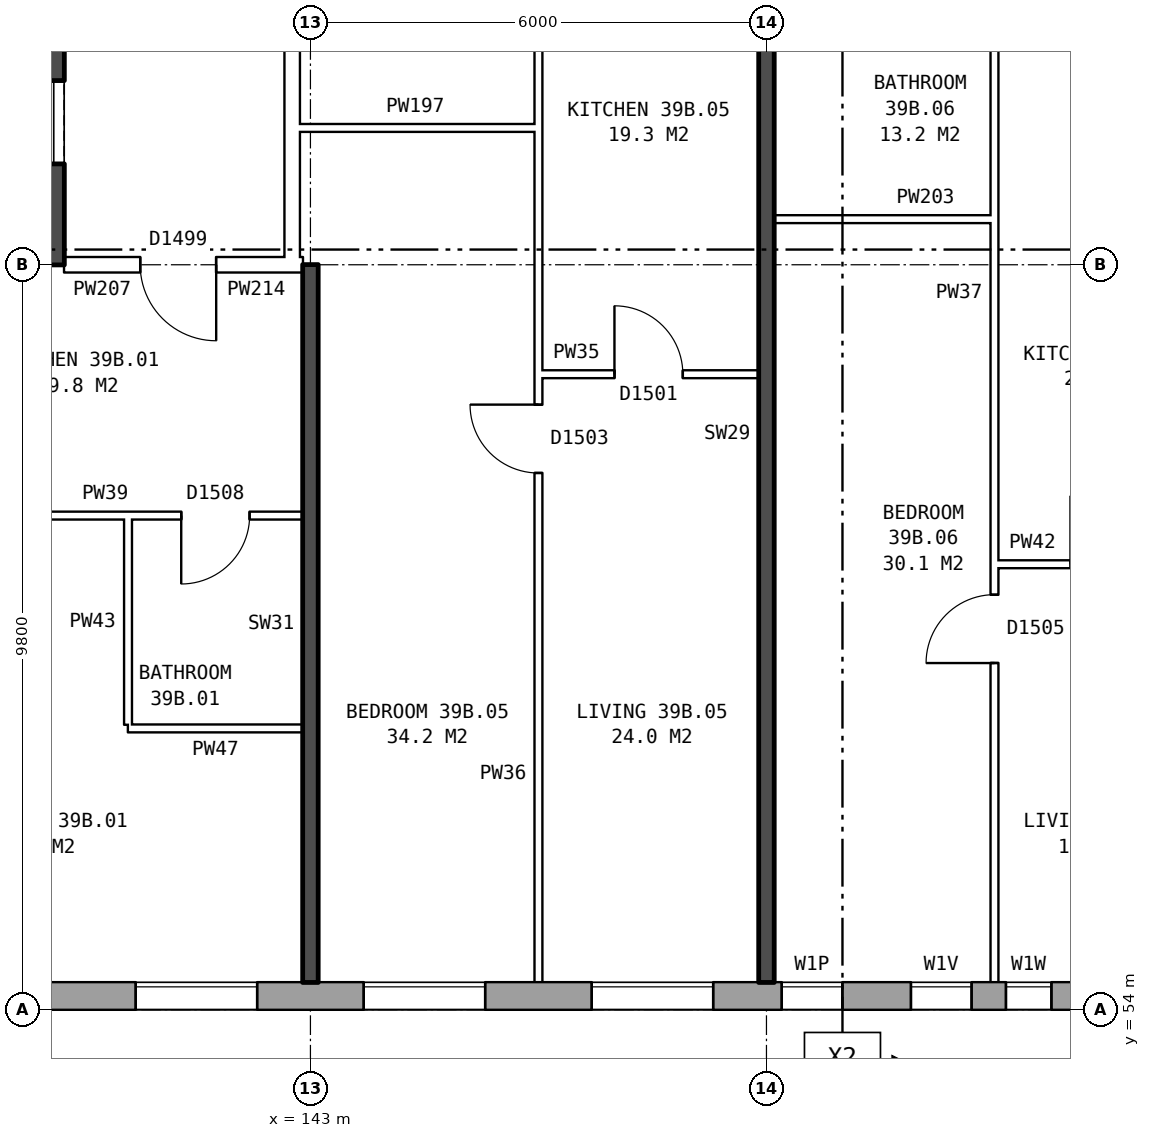
"""IFC4 building model, lengths in metres.
Left out: names, types, materials, properties, quantities, classifications, styles, units other than length and angle.
Written with IfcOpenShell. Run it as: python <this file> out.ifc"""

import sys

from ifc_helpers import new_model, si_unit, direction, frame, frame_2d, origin, place, context, subcontext, project, spatial, rectangle, extrude, element, fill, save


model = new_model("IFC4")
c1 = context("Model", 3, precision=1e-05, world=origin(), true_north=direction((0.0, 1.0)))
c2 = subcontext(c1, "Body", "Model", "MODEL_VIEW")
j1 = project(units=[si_unit("LENGTHUNIT", "METRE"), si_unit("PLANEANGLEUNIT", "RADIAN")], contexts=[c1])
p1 = place(None, origin())
s1 = spatial("IfcSite", under=j1, at=p1, CompositionType="ELEMENT")
p2 = place(p1, origin())
s2 = spatial("IfcBuilding", under=s1, at=p2, CompositionType="ELEMENT")
p3 = place(p2, frame((0.0, 0.0, 139.2)))
s3 = spatial("IfcBuildingStorey", under=s2, at=p3, CompositionType="ELEMENT", Elevation=139.2)
p4 = place(p3, frame((134.075, 54.18, 0.0), z_axis=(0.0, 0.0, 1.0), x_axis=(1.0, 0.0, 0.0)))
e1 = element("IfcWall", 1, at=p4, inside=s3, PredefinedType="STANDARD", context=c2, shape_type="SweptSolid", body=[
    extrude(rectangle(XDim=35.601, YDim=0.36, at=frame_2d((17.8, 0.0))), origin(), (0.0, 0.0, 1.0), 2.85),
])
p5 = place(p4, frame((0.625, 0.0, 0.8)))
e2 = element("IfcOpeningElement", 2, at=p5, cuts=e1, PredefinedType="OPENING", context=c2, shape_type="SweptSolid", body=[
    extrude(rectangle(XDim=1.6, YDim=1.8, at=frame_2d((0.8, 0.9))), frame((0.0, 0.19, 0.0), z_axis=(0.0, -1.0, 0.0), x_axis=(1.0, 0.0, 0.0)), (0.0, 0.0, 1.0), 0.38),
])
p6 = place(p4, frame((3.625, 0.0, 0.8)))
e3 = element("IfcOpeningElement", 3, at=p6, cuts=e1, PredefinedType="OPENING", context=c2, shape_type="SweptSolid", body=[
    extrude(rectangle(XDim=1.6, YDim=1.8, at=frame_2d((0.8, 0.9))), frame((0.0, 0.19, 0.0), z_axis=(0.0, -1.0, 0.0), x_axis=(1.0, 0.0, 0.0)), (0.0, 0.0, 1.0), 0.38),
])
p7 = place(p4, frame((6.625, 0.0, 0.8)))
e4 = element("IfcOpeningElement", 4, at=p7, cuts=e1, PredefinedType="OPENING", context=c2, shape_type="SweptSolid", body=[
    extrude(rectangle(XDim=1.6, YDim=1.8, at=frame_2d((0.8, 0.9))), frame((0.0, 0.19, 0.0), z_axis=(0.0, -1.0, 0.0), x_axis=(1.0, 0.0, 0.0)), (0.0, 0.0, 1.0), 0.38),
])
p8 = place(p4, frame((9.625, 0.0, 0.8)))
e5 = element("IfcOpeningElement", 5, at=p8, cuts=e1, PredefinedType="OPENING", context=c2, shape_type="SweptSolid", body=[
    extrude(rectangle(XDim=1.6, YDim=1.8, at=frame_2d((0.8, 0.9))), frame((0.0, 0.19, 0.0), z_axis=(0.0, -1.0, 0.0), x_axis=(1.0, 0.0, 0.0)), (0.0, 0.0, 1.0), 0.38),
])
p9 = place(p4, frame((12.625, 0.0, 0.8)))
e6 = element("IfcOpeningElement", 6, at=p9, cuts=e1, PredefinedType="OPENING", context=c2, shape_type="SweptSolid", body=[
    extrude(rectangle(XDim=1.6, YDim=1.8, at=frame_2d((0.8, 0.9))), frame((0.0, 0.19, 0.0), z_axis=(0.0, -1.0, 0.0), x_axis=(1.0, 0.0, 0.0)), (0.0, 0.0, 1.0), 0.38),
])
p10 = place(p4, frame((15.125, 0.0, 1.25)))
e7 = element("IfcOpeningElement", 7, at=p10, cuts=e1, PredefinedType="OPENING", context=c2, shape_type="SweptSolid", body=[
    extrude(rectangle(XDim=0.8, YDim=1.2, at=frame_2d((0.4, 0.6))), frame((0.0, 0.19, 0.0), z_axis=(0.0, -1.0, 0.0), x_axis=(1.0, 0.0, 0.0)), (0.0, 0.0, 1.0), 0.38),
])
p11 = place(p4, frame((18.075, 0.0, 0.25)))
e8 = element("IfcOpeningElement", 8, at=p11, cuts=e1, PredefinedType="OPENING", context=c2, shape_type="SweptSolid", body=[
    extrude(rectangle(XDim=0.6, YDim=0.9, at=frame_2d((0.3, 0.45))), frame((0.0, 0.19, 0.0), z_axis=(0.0, -1.0, 0.0), x_axis=(1.0, 0.0, 0.0)), (0.0, 0.0, 1.0), 0.38),
])
p12 = place(p4, frame((21.625, 0.0, 0.8)))
e9 = element("IfcOpeningElement", 9, at=p12, cuts=e1, PredefinedType="OPENING", context=c2, shape_type="SweptSolid", body=[
    extrude(rectangle(XDim=1.6, YDim=1.8, at=frame_2d((0.8, 0.9))), frame((0.0, 0.19, 0.0), z_axis=(0.0, -1.0, 0.0), x_axis=(1.0, 0.0, 0.0)), (0.0, 0.0, 1.0), 0.38),
])
p13 = place(p4, frame((24.625, 0.0, 0.8)))
e10 = element("IfcOpeningElement", 10, at=p13, cuts=e1, PredefinedType="OPENING", context=c2, shape_type="SweptSolid", body=[
    extrude(rectangle(XDim=1.6, YDim=1.8, at=frame_2d((0.8, 0.9))), frame((0.0, 0.19, 0.0), z_axis=(0.0, -1.0, 0.0), x_axis=(1.0, 0.0, 0.0)), (0.0, 0.0, 1.0), 0.38),
])
p14 = place(p4, frame((27.625, 0.0, 0.8)))
e11 = element("IfcOpeningElement", 11, at=p14, cuts=e1, PredefinedType="OPENING", context=c2, shape_type="SweptSolid", body=[
    extrude(rectangle(XDim=1.6, YDim=1.8, at=frame_2d((0.8, 0.9))), frame((0.0, 0.19, 0.0), z_axis=(0.0, -1.0, 0.0), x_axis=(1.0, 0.0, 0.0)), (0.0, 0.0, 1.0), 0.38),
])
p15 = place(p4, frame((30.625, 0.0, 0.8)))
e12 = element("IfcOpeningElement", 12, at=p15, cuts=e1, PredefinedType="OPENING", context=c2, shape_type="SweptSolid", body=[
    extrude(rectangle(XDim=1.6, YDim=1.8, at=frame_2d((0.8, 0.9))), frame((0.0, 0.19, 0.0), z_axis=(0.0, -1.0, 0.0), x_axis=(1.0, 0.0, 0.0)), (0.0, 0.0, 1.0), 0.38),
])
p16 = place(p4, frame((33.625, 0.0, 0.8)))
e13 = element("IfcOpeningElement", 13, at=p16, cuts=e1, PredefinedType="OPENING", context=c2, shape_type="SweptSolid", body=[
    extrude(rectangle(XDim=1.6, YDim=1.8, at=frame_2d((0.8, 0.9))), frame((0.0, 0.19, 0.0), z_axis=(0.0, -1.0, 0.0), x_axis=(1.0, 0.0, 0.0)), (0.0, 0.0, 1.0), 0.38),
])
p17 = place(p4, frame((16.825, 0.0, 0.15)))
e14 = element("IfcOpeningElement", 14, at=p17, cuts=e1, PredefinedType="OPENING", context=c2, shape_type="SweptSolid", body=[
    extrude(rectangle(XDim=0.8, YDim=0.9, at=frame_2d((0.4, 0.45))), frame((0.0, 0.19, 0.0), z_axis=(0.0, -1.0, 0.0), x_axis=(1.0, 0.0, 0.0)), (0.0, 0.0, 1.0), 0.38),
])
p18 = place(p4, frame((19.325, 0.0, 1.65)))
e15 = element("IfcOpeningElement", 15, at=p18, cuts=e1, PredefinedType="OPENING", context=c2, shape_type="SweptSolid", body=[
    extrude(rectangle(XDim=1.4, YDim=0.9, at=frame_2d((0.7, 0.45))), frame((0.0, 0.19, 0.0), z_axis=(0.0, -1.0, 0.0), x_axis=(1.0, 0.0, 0.0)), (0.0, 0.0, 1.0), 0.38),
])
p19 = place(p3, frame((139.485, 63.8, 0.0), z_axis=(0.0, 0.0, 1.0), x_axis=(0.0, 1.0, 0.0)))
e16 = element("IfcWall", 16, at=p19, inside=s3, PredefinedType="SHEAR", context=c2, shape_type="SweptSolid", body=[
    extrude(rectangle(XDim=12.4, YDim=0.55, at=frame_2d((6.2, 0.0))), origin(), (0.0, 0.0, 1.0), 2.85),
])
p20 = place(p19, frame((1.325, 0.0, 0.0)))
e17 = element("IfcOpeningElement", 17, at=p20, cuts=e16, PredefinedType="OPENING", context=c2, shape_type="SweptSolid", body=[
    extrude(rectangle(XDim=1.1, YDim=2.1, at=frame_2d((0.55, 1.05))), frame((0.0, 0.285, 0.0), z_axis=(0.0, -1.0, 0.0), x_axis=(1.0, 0.0, 0.0)), (0.0, 0.0, 1.0), 0.57),
])
p21 = place(p19, frame((3.6, 0.0, 0.0)))
e18 = element("IfcOpeningElement", 18, at=p21, cuts=e16, PredefinedType="OPENING", context=c2, shape_type="SweptSolid", body=[
    extrude(rectangle(XDim=1.1, YDim=2.1, at=frame_2d((0.55, 1.05))), frame((0.0, 0.285, 0.0), z_axis=(0.0, -1.0, 0.0), x_axis=(1.0, 0.0, 0.0)), (0.0, 0.0, 1.0), 0.57),
])
p22 = place(p19, frame((5.8, 0.0, 0.0)))
e19 = element("IfcOpeningElement", 19, at=p22, cuts=e16, PredefinedType="OPENING", context=c2, shape_type="SweptSolid", body=[
    extrude(rectangle(XDim=1.1, YDim=2.1, at=frame_2d((0.55, 1.05))), frame((0.0, 0.285, 0.0), z_axis=(0.0, -1.0, 0.0), x_axis=(1.0, 0.0, 0.0)), (0.0, 0.0, 1.0), 0.57),
])
p23 = place(p19, frame((9.9, 0.0, 0.0)))
e20 = element("IfcOpeningElement", 20, at=p23, cuts=e16, PredefinedType="OPENING", context=c2, shape_type="SweptSolid", body=[
    extrude(rectangle(XDim=1.1, YDim=2.1, at=frame_2d((0.55, 1.05))), frame((0.0, 0.285, 0.0), z_axis=(0.0, -1.0, 0.0), x_axis=(1.0, 0.0, 0.0)), (0.0, 0.0, 1.0), 0.57),
])
p24 = place(p19, frame((8.125, 0.0, 0.0)))
e21 = element("IfcOpeningElement", 21, at=p24, cuts=e16, PredefinedType="OPENING", context=c2, shape_type="SweptSolid", body=[
    extrude(rectangle(XDim=0.85, YDim=2.1, at=frame_2d((0.425, 1.05))), frame((0.0, 0.285, 0.0), z_axis=(0.0, -1.0, 0.0), x_axis=(1.0, 0.0, 0.0)), (0.0, 0.0, 1.0), 0.57),
])
p25 = place(p3, frame((142.76, 63.9, 0.0), z_axis=(0.0, 0.0, 1.0), x_axis=(0.0, 1.0, 0.0)))
e22 = element("IfcWall", 22, at=p25, inside=s3, PredefinedType="PARTITIONING", context=c2, shape_type="SweptSolid", body=[
    extrude(rectangle(XDim=12.2, YDim=0.2, at=frame_2d((6.1, 0.0))), origin(), (0.0, 0.0, 1.0), 2.85),
])
p26 = place(p25, frame((5.1, 0.0, 0.0)))
e23 = element("IfcOpeningElement", 23, at=p26, cuts=e22, PredefinedType="OPENING", context=c2, shape_type="SweptSolid", body=[
    extrude(rectangle(XDim=2.0, YDim=2.1, at=frame_2d((1.0, 1.05))), frame((0.0, 0.11, 0.0), z_axis=(0.0, -1.0, 0.0), x_axis=(1.0, 0.0, 0.0)), (0.0, 0.0, 1.0), 0.22),
])
p27 = place(p3, frame((140.6, 57.7, 0.0), z_axis=(0.0, 0.0, 1.0), x_axis=(1.0, 0.0, 0.0)))
e24 = element("IfcWall", 24, at=p27, inside=s3, PredefinedType="PARTITIONING", context=c2, shape_type="SweptSolid", body=[
    extrude(rectangle(XDim=2.3, YDim=0.1, at=frame_2d((1.15, 0.0))), origin(), (0.0, 0.0, 1.0), 2.85),
])
p28 = place(p3, frame((152.0, 59.86, 0.0), z_axis=(0.0, 0.0, 1.0), x_axis=(1.0, 0.0, 0.0)))
e25 = element("IfcWall", 25, at=p28, inside=s3, PredefinedType="PARTITIONING", context=c2, shape_type="SweptSolid", body=[
    extrude(rectangle(XDim=2.9, YDim=0.1, at=frame_2d((1.45, 0.0))), origin(), (0.0, 0.0, 1.0), 2.85),
])
p29 = place(p28, frame((1.0, 0.0, 0.0)))
e26 = element("IfcOpeningElement", 26, at=p29, cuts=e25, PredefinedType="OPENING", context=c2, shape_type="SweptSolid", body=[
    extrude(rectangle(XDim=0.9, YDim=2.1, at=frame_2d((0.45, 1.05))), frame((0.0, 0.06, 0.0), z_axis=(0.0, -1.0, 0.0), x_axis=(1.0, 0.0, 0.0)), (0.0, 0.0, 1.0), 0.12),
])
p30 = place(p3, frame((137.1, 60.5, 0.0), z_axis=(0.0, 0.0, 1.0), x_axis=(1.0, 0.0, 0.0)))
e27 = element("IfcWall", 27, at=p30, inside=s3, PredefinedType="PARTITIONING", context=c2, shape_type="SweptSolid", body=[
    extrude(rectangle(XDim=5.8, YDim=0.1, at=frame_2d((2.9, 0.0))), origin(), (0.0, 0.0, 1.0), 2.85),
])
p31 = place(p30, frame((1.3, 0.0, 0.0)))
e28 = element("IfcOpeningElement", 28, at=p31, cuts=e27, PredefinedType="OPENING", context=c2, shape_type="SweptSolid", body=[
    extrude(rectangle(XDim=0.9, YDim=2.1, at=frame_2d((0.45, 1.05))), frame((0.0, 0.06, 0.0), z_axis=(0.0, -1.0, 0.0), x_axis=(1.0, 0.0, 0.0)), (0.0, 0.0, 1.0), 0.12),
])
p32 = place(p30, frame((4.2, 0.0, 0.0)))
e29 = element("IfcOpeningElement", 29, at=p32, cuts=e27, PredefinedType="OPENING", context=c2, shape_type="SweptSolid", body=[
    extrude(rectangle(XDim=0.9, YDim=2.1, at=frame_2d((0.45, 1.05))), frame((0.0, 0.06, 0.0), z_axis=(0.0, -1.0, 0.0), x_axis=(1.0, 0.0, 0.0)), (0.0, 0.0, 1.0), 0.12),
])
p33 = place(p3, frame((146.0, 62.36, 0.0), z_axis=(0.0, 0.0, 1.0), x_axis=(1.0, 0.0, 0.0)))
e30 = element("IfcWall", 30, at=p33, inside=s3, PredefinedType="PARTITIONING", context=c2, shape_type="SweptSolid", body=[
    extrude(rectangle(XDim=2.9, YDim=0.1, at=frame_2d((1.45, 0.0))), origin(), (0.0, 0.0, 1.0), 2.85),
])
p34 = place(p33, frame((1.0, 0.0, 0.0)))
e31 = element("IfcOpeningElement", 31, at=p34, cuts=e30, PredefinedType="OPENING", context=c2, shape_type="SweptSolid", body=[
    extrude(rectangle(XDim=0.9, YDim=2.1, at=frame_2d((0.45, 1.05))), frame((0.0, 0.06, 0.0), z_axis=(0.0, -1.0, 0.0), x_axis=(1.0, 0.0, 0.0)), (0.0, 0.0, 1.0), 0.12),
])
p35 = place(p3, frame((139.76, 63.8, 0.0), z_axis=(0.0, 0.0, 1.0), x_axis=(1.0, 0.0, 0.0)))
e32 = element("IfcWall", 32, at=p35, inside=s3, PredefinedType="PARTITIONING", context=c2, shape_type="SweptSolid", body=[
    extrude(rectangle(XDim=3.0, YDim=0.2, at=frame_2d((1.5, 0.0))), origin(), (0.0, 0.0, 1.0), 2.85),
])
p36 = place(p35, frame((1.0, 0.0, 0.0)))
e33 = element("IfcOpeningElement", 33, at=p36, cuts=e32, PredefinedType="OPENING", context=c2, shape_type="SweptSolid", body=[
    extrude(rectangle(XDim=1.0, YDim=2.1, at=frame_2d((0.5, 1.05))), frame((0.0, 0.11, 0.0), z_axis=(0.0, -1.0, 0.0), x_axis=(1.0, 0.0, 0.0)), (0.0, 0.0, 1.0), 0.22),
])
p37 = place(p3, frame((142.76, 63.8, 0.0), z_axis=(0.0, 0.0, 1.0), x_axis=(1.0, 0.0, 0.0)))
e34 = element("IfcWall", 34, at=p37, inside=s3, PredefinedType="PARTITIONING", context=c2, shape_type="SweptSolid", body=[
    extrude(rectangle(XDim=0.14, YDim=0.2, at=frame_2d((0.07, 0.0))), origin(), (0.0, 0.0, 1.0), 2.85),
])
p38 = place(p3, frame((149.1, 64.4, 0.0), z_axis=(0.0, 0.0, 1.0), x_axis=(1.0, 0.0, 0.0)))
e35 = element("IfcWall", 35, at=p38, inside=s3, PredefinedType="PARTITIONING", context=c2, shape_type="SweptSolid", body=[
    extrude(rectangle(XDim=2.9, YDim=0.1, at=frame_2d((1.45, 0.0))), origin(), (0.0, 0.0, 1.0), 2.85),
])
p39 = place(p3, frame((142.76, 65.6, 0.0), z_axis=(0.0, 0.0, 1.0), x_axis=(1.0, 0.0, 0.0)))
e36 = element("IfcWall", 36, at=p39, inside=s3, PredefinedType="PARTITIONING", context=c2, shape_type="SweptSolid", body=[
    extrude(rectangle(XDim=3.24, YDim=0.1, at=frame_2d((1.62, 0.0))), origin(), (0.0, 0.0, 1.0), 2.85),
])
p40 = place(p3, frame((140.6, 57.75, 0.0), z_axis=(0.0, 0.0, 1.0), x_axis=(0.0, 1.0, 0.0)))
e37 = element("IfcWall", 37, at=p40, inside=s3, PredefinedType="PARTITIONING", context=c2, shape_type="SweptSolid", body=[
    extrude(rectangle(XDim=2.7, YDim=0.1, at=frame_2d((1.35, 0.0))), origin(), (0.0, 0.0, 1.0), 2.85),
])
p41 = place(p3, frame((143.0, 54.36, 0.0), z_axis=(0.0, 0.0, 1.0), x_axis=(0.0, 1.0, 0.0)))
e38 = element("IfcWall", 38, at=p41, inside=s3, PredefinedType="SOLIDWALL", context=c2, shape_type="SweptSolid", body=[
    extrude(rectangle(XDim=9.44, YDim=0.2, at=frame_2d((4.72, 0.0))), origin(), (0.0, 0.0, 1.0), 2.85),
])
p42 = place(p3, frame((146.0, 54.36, 0.0), z_axis=(0.0, 0.0, 1.0), x_axis=(0.0, 1.0, 0.0)))
e39 = element("IfcWall", 39, at=p42, inside=s3, PredefinedType="PARTITIONING", context=c2, shape_type="SweptSolid", body=[
    extrude(rectangle(XDim=14.34, YDim=0.1, at=frame_2d((7.17, 0.0))), origin(), (0.0, 0.0, 1.0), 2.85),
])
p43 = place(p42, frame((6.7, 0.0, 0.0)))
e40 = element("IfcOpeningElement", 40, at=p43, cuts=e39, PredefinedType="OPENING", context=c2, shape_type="SweptSolid", body=[
    extrude(rectangle(XDim=0.9, YDim=2.1, at=frame_2d((0.45, 1.05))), frame((0.0, 0.06, 0.0), z_axis=(0.0, -1.0, 0.0), x_axis=(1.0, 0.0, 0.0)), (0.0, 0.0, 1.0), 0.12),
])
p44 = place(p42, frame((13.04, 0.0, 0.0)))
e41 = element("IfcOpeningElement", 41, at=p44, cuts=e39, PredefinedType="OPENING", context=c2, shape_type="SweptSolid", body=[
    extrude(rectangle(XDim=0.9, YDim=2.1, at=frame_2d((0.45, 1.05))), frame((0.0, 0.06, 0.0), z_axis=(0.0, -1.0, 0.0), x_axis=(1.0, 0.0, 0.0)), (0.0, 0.0, 1.0), 0.12),
])
p45 = place(p3, frame((149.0, 54.36, 0.0), z_axis=(0.0, 0.0, 1.0), x_axis=(0.0, 1.0, 0.0)))
e42 = element("IfcWall", 42, at=p45, inside=s3, PredefinedType="SOLIDWALL", context=c2, shape_type="SweptSolid", body=[
    extrude(rectangle(XDim=14.44, YDim=0.2, at=frame_2d((7.22, 0.0))), origin(), (0.0, 0.0, 1.0), 2.85),
])
p46 = place(p3, frame((152.0, 54.36, 0.0), z_axis=(0.0, 0.0, 1.0), x_axis=(0.0, 1.0, 0.0)))
e43 = element("IfcWall", 43, at=p46, inside=s3, PredefinedType="PARTITIONING", context=c2, shape_type="SweptSolid", body=[
    extrude(rectangle(XDim=14.34, YDim=0.1, at=frame_2d((7.17, 0.0))), origin(), (0.0, 0.0, 1.0), 2.85),
])
p47 = place(p46, frame((4.2, 0.0, 0.0)))
e44 = element("IfcOpeningElement", 44, at=p47, cuts=e43, PredefinedType="OPENING", context=c2, shape_type="SweptSolid", body=[
    extrude(rectangle(XDim=0.9, YDim=2.1, at=frame_2d((0.45, 1.05))), frame((0.0, 0.06, 0.0), z_axis=(0.0, -1.0, 0.0), x_axis=(1.0, 0.0, 0.0)), (0.0, 0.0, 1.0), 0.12),
])
p48 = place(p46, frame((13.04, 0.0, 0.0)))
e45 = element("IfcOpeningElement", 45, at=p48, cuts=e43, PredefinedType="OPENING", context=c2, shape_type="SweptSolid", body=[
    extrude(rectangle(XDim=0.9, YDim=2.1, at=frame_2d((0.45, 1.05))), frame((0.0, 0.06, 0.0), z_axis=(0.0, -1.0, 0.0), x_axis=(1.0, 0.0, 0.0)), (0.0, 0.0, 1.0), 0.12),
])
p49 = place(p7, origin())
e46 = element("IfcWindow", 46, at=p49, inside=s3, PartitioningType="SINGLE_PANEL", PredefinedType="WINDOW", context=c2, shape_type="SweptSolid", body=[
    extrude(rectangle(XDim=1.6, YDim=1.8, at=frame_2d((0.8, 0.9))), frame((0.0, 0.15, 0.0), z_axis=(0.0, -1.0, 0.0), x_axis=(1.0, 0.0, 0.0)), (0.0, 0.0, 1.0), 0.06),
])
fill(e4, e46)
p50 = place(p8, origin())
e47 = element("IfcWindow", 47, at=p50, inside=s3, PartitioningType="SINGLE_PANEL", PredefinedType="WINDOW", context=c2, shape_type="SweptSolid", body=[
    extrude(rectangle(XDim=1.6, YDim=1.8, at=frame_2d((0.8, 0.9))), frame((0.0, 0.15, 0.0), z_axis=(0.0, -1.0, 0.0), x_axis=(1.0, 0.0, 0.0)), (0.0, 0.0, 1.0), 0.06),
])
fill(e5, e47)
p51 = place(p9, origin())
e48 = element("IfcWindow", 48, at=p51, inside=s3, PartitioningType="SINGLE_PANEL", PredefinedType="WINDOW", context=c2, shape_type="SweptSolid", body=[
    extrude(rectangle(XDim=1.6, YDim=1.8, at=frame_2d((0.8, 0.9))), frame((0.0, 0.15, 0.0), z_axis=(0.0, -1.0, 0.0), x_axis=(1.0, 0.0, 0.0)), (0.0, 0.0, 1.0), 0.06),
])
fill(e6, e48)
p52 = place(p10, origin())
e49 = element("IfcWindow", 49, at=p52, inside=s3, PartitioningType="SINGLE_PANEL", PredefinedType="WINDOW", context=c2, shape_type="SweptSolid", body=[
    extrude(rectangle(XDim=0.8, YDim=1.2, at=frame_2d((0.4, 0.6))), frame((0.0, 0.15, 0.0), z_axis=(0.0, -1.0, 0.0), x_axis=(1.0, 0.0, 0.0)), (0.0, 0.0, 1.0), 0.06),
])
fill(e7, e49)
p53 = place(p11, origin())
e50 = element("IfcWindow", 50, at=p53, inside=s3, PartitioningType="SINGLE_PANEL", PredefinedType="WINDOW", context=c2, shape_type="SweptSolid", body=[
    extrude(rectangle(XDim=0.6, YDim=0.9, at=frame_2d((0.3, 0.45))), frame((0.0, 0.15, 0.0), z_axis=(0.0, -1.0, 0.0), x_axis=(1.0, 0.0, 0.0)), (0.0, 0.0, 1.0), 0.06),
])
fill(e8, e50)
p54 = place(p36, frame((1.0, 0.0, 0.0), z_axis=(0.0, 0.0, 1.0), x_axis=(-1.0, 0.0, 0.0)))
e51 = element("IfcDoor", 51, at=p54, inside=s3, OperationType="SINGLE_SWING_LEFT", PredefinedType="DOOR", context=c2, shape_type="SweptSolid", body=[
    extrude(rectangle(XDim=1.0, YDim=2.1, at=frame_2d((0.5, 1.05))), frame((0.0, 0.025, 0.0), z_axis=(0.0, -1.0, 0.0), x_axis=(1.0, 0.0, 0.0)), (0.0, 0.0, 1.0), 0.05),
])
fill(e33, e51)
p55 = place(p32, frame((0.9, 0.0, 0.0), z_axis=(0.0, 0.0, 1.0), x_axis=(-1.0, 0.0, 0.0)))
e52 = element("IfcDoor", 52, at=p55, inside=s3, OperationType="SINGLE_SWING_RIGHT", PredefinedType="DOOR", context=c2, shape_type="SweptSolid", body=[
    extrude(rectangle(XDim=0.9, YDim=2.1, at=frame_2d((0.45, 1.05))), frame((0.0, 0.025, 0.0), z_axis=(0.0, -1.0, 0.0), x_axis=(1.0, 0.0, 0.0)), (0.0, 0.0, 1.0), 0.05),
])
fill(e29, e52)
p56 = place(p43, origin())
e53 = element("IfcDoor", 53, at=p56, inside=s3, OperationType="SINGLE_SWING_RIGHT", PredefinedType="DOOR", context=c2, shape_type="SweptSolid", body=[
    extrude(rectangle(XDim=0.9, YDim=2.1, at=frame_2d((0.45, 1.05))), frame((0.0, 0.025, 0.0), z_axis=(0.0, -1.0, 0.0), x_axis=(1.0, 0.0, 0.0)), (0.0, 0.0, 1.0), 0.05),
])
fill(e40, e53)
p57 = place(p34, origin())
e54 = element("IfcDoor", 54, at=p57, inside=s3, OperationType="SINGLE_SWING_LEFT", PredefinedType="DOOR", context=c2, shape_type="SweptSolid", body=[
    extrude(rectangle(XDim=0.9, YDim=2.1, at=frame_2d((0.45, 1.05))), frame((0.0, 0.025, 0.0), z_axis=(0.0, -1.0, 0.0), x_axis=(1.0, 0.0, 0.0)), (0.0, 0.0, 1.0), 0.05),
])
fill(e31, e54)
p58 = place(p47, origin())
e55 = element("IfcDoor", 55, at=p58, inside=s3, OperationType="SINGLE_SWING_LEFT", PredefinedType="DOOR", context=c2, shape_type="SweptSolid", body=[
    extrude(rectangle(XDim=0.9, YDim=2.1, at=frame_2d((0.45, 1.05))), frame((0.0, 0.025, 0.0), z_axis=(0.0, -1.0, 0.0), x_axis=(1.0, 0.0, 0.0)), (0.0, 0.0, 1.0), 0.05),
])
fill(e44, e55)
p59 = place(p17, origin())
e56 = element("IfcWindow", 56, at=p59, inside=s3, PartitioningType="SINGLE_PANEL", PredefinedType="WINDOW", context=c2, shape_type="SweptSolid", body=[
    extrude(rectangle(XDim=0.8, YDim=0.9, at=frame_2d((0.4, 0.45))), frame((0.0, 0.15, 0.0), z_axis=(0.0, -1.0, 0.0), x_axis=(1.0, 0.0, 0.0)), (0.0, 0.0, 1.0), 0.06),
])
fill(e14, e56)
save(model, sys.argv[1])
